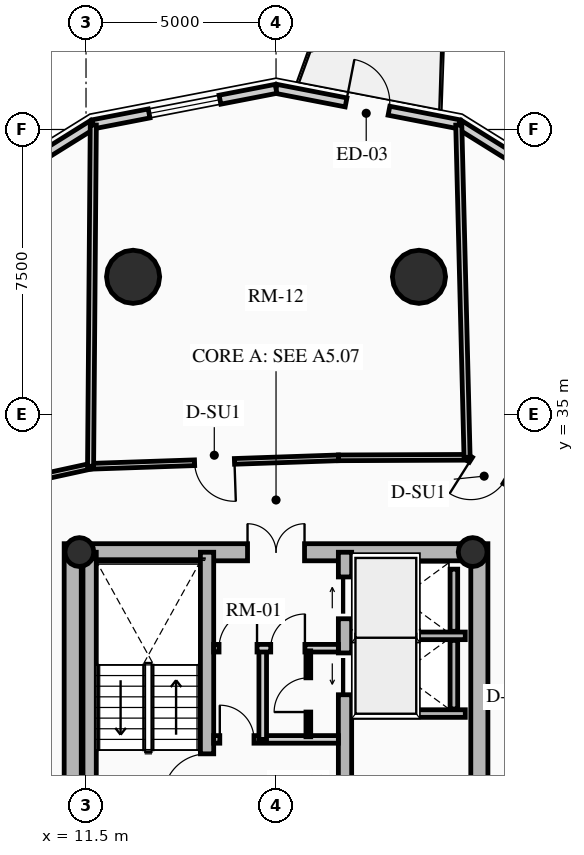
"""IFC4 building model, lengths in metres.
Left out: names, types, materials, properties, quantities, classifications, styles, units other than length and angle.
Written with IfcOpenShell. Run it as: python <this file> out.ifc"""

import sys

from ifc_helpers import new_model, si_unit, direction, frame, frame_2d, origin, origin_2d, place, context, subcontext, project, spatial, rectangle, circle, hollow_circle, extrude, source, transform, mapped, element, fill, save


model = new_model("IFC4")
c1 = context("Model", 3, precision=1e-05, world=origin(), true_north=direction((0.0, 1.0)))
c2 = subcontext(c1, "Body", "Model", "MODEL_VIEW")
j1 = project(units=[si_unit("LENGTHUNIT", "METRE"), si_unit("PLANEANGLEUNIT", "RADIAN")], contexts=[c1])
p1 = place(None, origin())
s1 = spatial("IfcSite", under=j1, at=p1, CompositionType="ELEMENT")
p2 = place(p1, origin())
s2 = spatial("IfcBuilding", under=s1, at=p2, CompositionType="ELEMENT")
p3 = place(p2, frame((0.0, 0.0, 84.7)))
s3 = spatial("IfcBuildingStorey", under=s2, at=p3, CompositionType="ELEMENT", Elevation=84.7)
for number, where, z_axis, x_axis in (
    (1, (11.15, 17.4, 0.0), (0.0, 0.0, 1.0), (0.0, 1.0, 0.0)),
    (2, (21.85, 17.4, 0.0), (0.0, 0.0, 1.0), (0.0, 1.0, 0.0)),
):
    element("IfcWall", number, at=place(p3, frame(where, z_axis=z_axis, x_axis=x_axis)), inside=s3, PredefinedType="SHEAR", context=c2, shape_type="SweptSolid", body=[
        extrude(rectangle(XDim=14.2, YDim=0.45, at=frame_2d((7.1, 0.0))), origin(), (0.0, 0.0, 1.0), 2.91),
    ])
p4 = place(p3, frame((11.15, 31.375, 0.0), z_axis=(0.0, 0.0, 1.0), x_axis=(1.0, 0.0, 0.0)))
e3 = element("IfcWall", 3, at=p4, inside=s3, PredefinedType="SHEAR", context=c2, shape_type="SweptSolid", body=[
    extrude(rectangle(XDim=10.7, YDim=0.45, at=frame_2d((5.35, 0.0))), origin(), (0.0, 0.0, 1.0), 2.91),
])
m1 = source(origin(), c2, "Body", "SweptSolid", [
    extrude(rectangle(XDim=1.5, YDim=2.02, at=frame_2d((0.75, 1.01))), frame((0.0, 0.235, 0.0), z_axis=(0.0, -1.0, 0.0), x_axis=(1.0, 0.0, 0.0)), (0.0, 0.0, 1.0), 0.47),
])
p5 = place(p4, frame((4.6, 0.0, 0.0)))
e4 = element("IfcOpeningElement", 4, at=p5, cuts=e3, PredefinedType="OPENING", context=c2, shape_type="MappedRepresentation", body=[
    mapped(m1, transform((0.0, 0.0, 0.0), x_axis=(1.0, 0.0, 0.0), y_axis=(0.0, 1.0, 0.0), z_axis=(0.0, 0.0, 1.0), scale=1.0)),
])
p6 = place(p3, frame((14.685, 17.625, 0.0), z_axis=(0.0, 0.0, 1.0), x_axis=(0.0, 1.0, 0.0)))
e5 = element("IfcWall", 5, at=p6, inside=s3, PredefinedType="SHEAR", context=c2, shape_type="SweptSolid", body=[
    extrude(rectangle(XDim=13.75, YDim=0.35, at=frame_2d((6.875, 0.0))), origin(), (0.0, 0.0, 1.0), 2.91),
])
m2 = source(origin(), c2, "Body", "SweptSolid", [
    extrude(rectangle(XDim=1.1, YDim=2.015, at=frame_2d((0.55, 1.007))), frame((0.0, 0.185, 0.0), z_axis=(0.0, -1.0, 0.0), x_axis=(1.0, 0.0, 0.0)), (0.0, 0.0, 1.0), 0.37),
])
p7 = place(p6, frame((4.875, 0.0, 0.0)))
e6 = element("IfcOpeningElement", 6, at=p7, cuts=e5, PredefinedType="OPENING", context=c2, shape_type="MappedRepresentation", body=[
    mapped(m2, transform((0.0, 0.0, 0.0), x_axis=(1.0, 0.0, 0.0), y_axis=(0.0, 1.0, 0.0), z_axis=(0.0, 0.0, 1.0), scale=1.0)),
])
m3 = source(origin(), c2, "Body", "SweptSolid", [
    extrude(rectangle(XDim=1.15, YDim=2.02, at=frame_2d((0.575, 1.01))), frame((0.0, 0.185, 0.0), z_axis=(0.0, -1.0, 0.0), x_axis=(1.0, 0.0, 0.0)), (0.0, 0.0, 1.0), 0.37),
])
p8 = place(p6, frame((7.295, 0.0, 0.0)))
e7 = element("IfcOpeningElement", 7, at=p8, cuts=e5, PredefinedType="OPENING", context=c2, shape_type="MappedRepresentation", body=[
    mapped(m3, transform((0.0, 0.0, 0.0), x_axis=(1.0, 0.0, 0.0), y_axis=(0.0, 1.0, 0.0), z_axis=(0.0, 0.0, 1.0), scale=1.0)),
])
p9 = place(p3, frame((18.315, 17.625, 0.0), z_axis=(0.0, 0.0, 1.0), x_axis=(0.0, 1.0, 0.0)))
e8 = element("IfcWall", 8, at=p9, inside=s3, PredefinedType="SHEAR", context=c2, shape_type="SweptSolid", body=[
    extrude(rectangle(XDim=13.75, YDim=0.35, at=frame_2d((6.875, 0.0))), origin(), (0.0, 0.0, 1.0), 2.91),
])
p10 = place(p9, frame((10.0, 0.0, 0.0)))
e9 = element("IfcOpeningElement", 9, at=p10, cuts=e8, PredefinedType="OPENING", context=c2, shape_type="MappedRepresentation", body=[
    mapped(m2, transform((0.0, 0.0, 0.0), x_axis=(1.0, 0.0, 0.0), y_axis=(0.0, 1.0, 0.0), z_axis=(0.0, 0.0, 1.0), scale=1.0)),
])
p11 = place(p9, frame((12.0, 0.0, 0.0)))
e10 = element("IfcOpeningElement", 10, at=p11, cuts=e8, PredefinedType="OPENING", context=c2, shape_type="MappedRepresentation", body=[
    mapped(m2, transform((0.0, 0.0, 0.0), x_axis=(1.0, 0.0, 0.0), y_axis=(0.0, 1.0, 0.0), z_axis=(0.0, 0.0, 1.0), scale=1.0)),
])
p12 = place(p9, frame((5.305, 0.0, 0.0)))
e11 = element("IfcOpeningElement", 11, at=p12, cuts=e8, PredefinedType="OPENING", context=c2, shape_type="MappedRepresentation", body=[
    mapped(m3, transform((0.0, 0.0, 0.0), x_axis=(1.0, 0.0, 0.0), y_axis=(0.0, 1.0, 0.0), z_axis=(0.0, 0.0, 1.0), scale=1.0)),
])
p13 = place(p3, frame((11.595, 24.655, 0.0), z_axis=(0.0, 0.0, 1.0), x_axis=(0.0, 1.0, 0.0)))
e12 = element("IfcWall", 12, at=p13, inside=s3, PredefinedType="SHEAR", context=c2, shape_type="SweptSolid", body=[
    extrude(rectangle(XDim=6.72, YDim=0.35, at=frame_2d((3.36, 0.0))), origin(), (0.0, 0.0, 1.0), 2.91),
])
for number, where, z_axis, x_axis in (
    (13, (11.325, 31.38, 0.0), (0.0, 0.0, 1.0), (1.0, 0.0, 0.0)),
    (14, (21.675, 31.38, 0.0), (0.0, 0.0, 1.0), (1.0, 0.0, 0.0)),
):
    element("IfcColumn", number, at=place(p3, frame(where, z_axis=z_axis, x_axis=x_axis)), inside=s3, PredefinedType="COLUMN", context=c2, shape_type="SweptSolid", body=[
        extrude(hollow_circle(Radius=0.38, WallThickness=0.032, at=origin_2d()), origin(), (0.0, 0.0, 1.0), 2.91),
    ])
for number, where, z_axis, x_axis in (
    (15, (20.261, 38.623, 0.0), (0.0, 0.0, 1.0), (1.0, 0.0, 0.0)),
    (16, (12.739, 38.623, 0.0), (0.0, 0.0, 1.0), (1.0, 0.0, 0.0)),
):
    element("IfcColumn", number, at=place(p3, frame(where, z_axis=z_axis, x_axis=x_axis)), inside=s3, PredefinedType="USERDEFINED", context=c2, shape_type="SweptSolid", body=[
        extrude(circle(Radius=0.7, at=origin_2d()), origin(), (0.0, 0.0, 1.0), 2.91),
    ])
p14 = place(p3, frame((21.315, 42.637, 0.0), z_axis=(0.0, 0.0, 1.0), x_axis=(0.848520380187, -0.529162701263, 0.0)))
e17 = element("IfcWall", 17, at=p14, inside=s3, PredefinedType="SOLIDWALL", context=c2, shape_type="SweptSolid", body=[
    extrude(rectangle(XDim=5.119, YDim=0.24, at=frame_2d((2.56, 0.0))), origin(), (0.0, 0.0, 1.0), 2.179),
])
p15 = place(p3, frame((16.5, 43.57, 0.0), z_axis=(0.0, 0.0, 1.0), x_axis=(0.981723785992, -0.190311344954, 0.0)))
e18 = element("IfcWall", 18, at=p15, inside=s3, PredefinedType="SOLIDWALL", context=c2, shape_type="SweptSolid", body=[
    extrude(rectangle(XDim=4.904, YDim=0.24, at=frame_2d((2.452, 0.0))), origin(), (0.0, 0.0, 1.0), 2.179),
])
m4 = source(origin(), c2, "Body", "SweptSolid", [
    extrude(rectangle(XDim=1.15, YDim=2.005, at=frame_2d((0.575, 1.002))), frame((0.0, 0.13, 0.0), z_axis=(0.0, -1.0, 0.0), x_axis=(1.0, 0.0, 0.0)), (0.0, 0.0, 1.0), 0.26),
])
p16 = place(p15, frame((1.877, 0.0, 0.0)))
e19 = element("IfcOpeningElement", 19, at=p16, cuts=e18, PredefinedType="OPENING", context=c2, shape_type="MappedRepresentation", body=[
    mapped(m4, transform((0.0, 0.0, 0.0), x_axis=(1.0, 0.0, 0.0), y_axis=(0.0, 1.0, 0.0), z_axis=(0.0, 0.0, 1.0), scale=1.0)),
])
p17 = place(p3, frame((11.685, 42.637, 0.0), z_axis=(0.0, 0.0, 1.0), x_axis=(0.981723785992, 0.190311344954, 0.0)))
e20 = element("IfcWall", 20, at=p17, inside=s3, PredefinedType="SOLIDWALL", context=c2, shape_type="SweptSolid", body=[
    extrude(rectangle(XDim=4.904, YDim=0.24, at=frame_2d((2.452, 0.0))), origin(), (0.0, 0.0, 1.0), 2.179),
])
m5 = source(origin(), c2, "Body", "SweptSolid", [
    extrude(rectangle(XDim=1.9, YDim=1.35, at=frame_2d((0.95, 0.675))), frame((0.0, 0.13, 0.0), z_axis=(0.0, -1.0, 0.0), x_axis=(1.0, 0.0, 0.0)), (0.0, 0.0, 1.0), 0.26),
])
p18 = place(p17, frame((1.502, 0.0, 0.65)))
e21 = element("IfcOpeningElement", 21, at=p18, cuts=e20, PredefinedType="OPENING", context=c2, shape_type="MappedRepresentation", body=[
    mapped(m5, transform((0.0, 0.0, 0.0), x_axis=(1.0, 0.0, 0.0), y_axis=(0.0, 1.0, 0.0), z_axis=(0.0, 0.0, 1.0), scale=1.0)),
])
p19 = place(p3, frame((7.342, 39.928, 0.0), z_axis=(0.0, 0.0, 1.0), x_axis=(0.848520380187, 0.529162701263, 0.0)))
e22 = element("IfcWall", 22, at=p19, inside=s3, PredefinedType="SOLIDWALL", context=c2, shape_type="SweptSolid", body=[
    extrude(rectangle(XDim=5.119, YDim=0.24, at=frame_2d((2.56, 0.0))), origin(), (0.0, 0.0, 1.0), 2.179),
])
for number, where, z_axis, x_axis in (
    (23, (18.51, 27.13, 0.0), (0.0, 0.0, 1.0), (1.0, 0.0, 0.0)),
    (24, (18.51, 29.175, 0.0), (0.0, 0.0, 1.0), (1.0, 0.0, 0.0)),
):
    element("IfcWall", number, at=place(p3, frame(where, z_axis=z_axis, x_axis=x_axis)), inside=s3, PredefinedType="SHEAR", context=c2, shape_type="SweptSolid", body=[
        extrude(rectangle(XDim=2.97, YDim=0.2, at=frame_2d((1.485, 0.0))), origin(), (0.0, 0.0, 1.0), 2.91),
    ])
p20 = place(p3, frame((21.18, 27.25, 0.0), z_axis=(0.0, 0.0, 1.0), x_axis=(0.0, 1.0, 0.0)))
e25 = element("IfcWall", 25, at=p20, inside=s3, PredefinedType="SHEAR", context=c2, shape_type="SweptSolid", body=[
    extrude(rectangle(XDim=1.805, YDim=0.2, at=frame_2d((0.902, 0.0))), origin(), (0.0, 0.0, 1.0), 2.91),
])
p21 = place(p3, frame((21.18, 29.295, 0.0), z_axis=(0.0, 0.0, 1.0), x_axis=(0.0, 1.0, 0.0)))
e26 = element("IfcWall", 26, at=p21, inside=s3, PredefinedType="SHEAR", context=c2, shape_type="SweptSolid", body=[
    extrude(rectangle(XDim=1.635, YDim=0.2, at=frame_2d((0.817, 0.0))), origin(), (0.0, 0.0, 1.0), 2.91),
])
p22 = place(p3, frame((14.86, 26.45, 0.0), z_axis=(0.0, 0.0, 1.0), x_axis=(1.0, 0.0, 0.0)))
e27 = element("IfcWall", 27, at=p22, inside=s3, PredefinedType="PARTITIONING", context=c2, shape_type="SweptSolid", body=[
    extrude(rectangle(XDim=3.28, YDim=0.2, at=frame_2d((1.64, 0.0))), origin(), (0.0, 0.0, 1.0), 2.655),
])
m6 = source(origin(), c2, "Body", "SweptSolid", [
    extrude(rectangle(XDim=0.9, YDim=2.005, at=frame_2d((0.45, 1.002))), frame((0.0, 0.11, 0.0), z_axis=(0.0, -1.0, 0.0), x_axis=(1.0, 0.0, 0.0)), (0.0, 0.0, 1.0), 0.22),
])
p23 = place(p22, frame((0.16, 0.0, 0.0)))
e28 = element("IfcOpeningElement", 28, at=p23, cuts=e27, PredefinedType="OPENING", context=c2, shape_type="MappedRepresentation", body=[
    mapped(m6, transform((0.0, 0.0, 0.0), x_axis=(1.0, 0.0, 0.0), y_axis=(0.0, 1.0, 0.0), z_axis=(0.0, 0.0, 1.0), scale=1.0)),
])
p24 = place(p3, frame((16.15, 26.45, 0.0), z_axis=(0.0, 0.0, 1.0), x_axis=(0.0, 1.0, 0.0)))
e29 = element("IfcWall", 29, at=p24, inside=s3, PredefinedType="PARTITIONING", context=c2, shape_type="SweptSolid", body=[
    extrude(rectangle(XDim=2.4, YDim=0.2, at=frame_2d((1.2, 0.0))), origin(), (0.0, 0.0, 1.0), 2.655),
])
p25 = place(p3, frame((14.86, 28.85, 0.0), z_axis=(0.0, 0.0, 1.0), x_axis=(1.0, 0.0, 0.0)))
e30 = element("IfcWall", 30, at=p25, inside=s3, PredefinedType="PARTITIONING", context=c2, shape_type="SweptSolid", body=[
    extrude(rectangle(XDim=3.28, YDim=0.2, at=frame_2d((1.64, 0.0))), origin(), (0.0, 0.0, 1.0), 2.655),
])
m7 = source(origin(), c2, "Body", "SweptSolid", [
    extrude(rectangle(XDim=1.0, YDim=2.015, at=frame_2d((0.5, 1.007))), frame((0.0, 0.11, 0.0), z_axis=(0.0, -1.0, 0.0), x_axis=(1.0, 0.0, 0.0)), (0.0, 0.0, 1.0), 0.22),
])
p26 = place(p25, frame((0.14, 0.0, 0.0)))
e31 = element("IfcOpeningElement", 31, at=p26, cuts=e30, PredefinedType="OPENING", context=c2, shape_type="MappedRepresentation", body=[
    mapped(m7, transform((0.0, 0.0, 0.0), x_axis=(1.0, 0.0, 0.0), y_axis=(0.0, 1.0, 0.0), z_axis=(0.0, 0.0, 1.0), scale=1.0)),
])
p27 = place(p25, frame((1.5, 0.0, 0.0)))
e32 = element("IfcOpeningElement", 32, at=p27, cuts=e30, PredefinedType="OPENING", context=c2, shape_type="MappedRepresentation", body=[
    mapped(m6, transform((0.0, 0.0, 0.0), x_axis=(1.0, 0.0, 0.0), y_axis=(0.0, 1.0, 0.0), z_axis=(0.0, 0.0, 1.0), scale=1.0)),
])
p28 = place(p3, frame((17.35, 26.52, 0.0), z_axis=(0.0, 0.0, 1.0), x_axis=(0.0, 1.0, 0.0)))
e33 = element("IfcWall", 33, at=p28, inside=s3, PredefinedType="PARTITIONING", context=c2, shape_type="SweptSolid", body=[
    extrude(rectangle(XDim=2.26, YDim=0.125, at=frame_2d((1.13, 0.0))), origin(), (0.0, 0.0, 1.0), 2.655),
])
m8 = source(origin(), c2, "Body", "SweptSolid", [
    extrude(rectangle(XDim=0.9, YDim=2.005, at=frame_2d((0.45, 1.002))), frame((0.0, 0.073, 0.0), z_axis=(0.0, -1.0, 0.0), x_axis=(1.0, 0.0, 0.0)), (0.0, 0.0, 1.0), 0.145),
])
p29 = place(p28, frame((0.65, 0.0, 0.0)))
e34 = element("IfcOpeningElement", 34, at=p29, cuts=e33, PredefinedType="OPENING", context=c2, shape_type="MappedRepresentation", body=[
    mapped(m8, transform((0.0, 0.0, 0.0), x_axis=(1.0, 0.0, 0.0), y_axis=(0.0, 1.0, 0.0), z_axis=(0.0, 0.0, 1.0), scale=1.0)),
])
p30 = place(p3, frame((22.877, 33.022, 0.0), z_axis=(0.0, 0.0, 1.0), x_axis=(-0.845895608855, 0.533348496689, 0.0)))
e35 = element("IfcWall", 35, at=p30, inside=s3, PredefinedType="PARTITIONING", context=c2, shape_type="SweptSolid", body=[
    extrude(rectangle(XDim=1.597, YDim=0.15, at=frame_2d((0.798, 0.0))), origin(), (0.0, 0.0, 1.0), 2.225),
])
m9 = source(origin(), c2, "Body", "SweptSolid", [
    extrude(rectangle(XDim=1.05, YDim=2.015, at=frame_2d((0.525, 1.007))), frame((0.0, 0.085, 0.0), z_axis=(0.0, -1.0, 0.0), x_axis=(1.0, 0.0, 0.0)), (0.0, 0.0, 1.0), 0.17),
])
p31 = place(p30, frame((0.427, 0.0, 0.0)))
e36 = element("IfcOpeningElement", 36, at=p31, cuts=e35, PredefinedType="OPENING", context=c2, shape_type="MappedRepresentation", body=[
    mapped(m9, transform((0.0, 0.0, 0.0), x_axis=(1.0, 0.0, 0.0), y_axis=(0.0, 1.0, 0.0), z_axis=(0.0, 0.0, 1.0), scale=1.0)),
])
p32 = place(p3, frame((21.527, 33.873, 0.0), z_axis=(0.0, 0.0, 1.0), x_axis=(-0.999991838845, -0.004040079574, 0.0)))
e37 = element("IfcWall", 37, at=p32, inside=s3, PredefinedType="PARTITIONING", context=c2, shape_type="SweptSolid", body=[
    extrude(rectangle(XDim=3.384, YDim=0.15, at=frame_2d((1.692, 0.0))), origin(), (0.0, 0.0, 1.0), 2.225),
])
p33 = place(p3, frame((18.143, 33.86, 0.0), z_axis=(0.0, 0.0, 1.0), x_axis=(-0.999419208319, -0.034077060363, 0.0)))
e38 = element("IfcWall", 38, at=p33, inside=s3, PredefinedType="PARTITIONING", context=c2, shape_type="SweptSolid", body=[
    extrude(rectangle(XDim=6.527, YDim=0.15, at=frame_2d((3.263, 0.0))), origin(), (0.0, 0.0, 1.0), 2.225),
])
p34 = place(p33, frame((2.738, 0.0, 0.0)))
e39 = element("IfcOpeningElement", 39, at=p34, cuts=e38, PredefinedType="OPENING", context=c2, shape_type="MappedRepresentation", body=[
    mapped(m9, transform((0.0, 0.0, 0.0), x_axis=(1.0, 0.0, 0.0), y_axis=(0.0, 1.0, 0.0), z_axis=(0.0, 0.0, 1.0), scale=1.0)),
])
p35 = place(p3, frame((11.62, 33.637, 0.0), z_axis=(0.0, 0.0, 1.0), x_axis=(-0.97702579435, -0.213121085711, 0.0)))
e40 = element("IfcWall", 40, at=p35, inside=s3, PredefinedType="PARTITIONING", context=c2, shape_type="SweptSolid", body=[
    extrude(rectangle(XDim=1.935, YDim=0.15, at=frame_2d((0.967, 0.0))), origin(), (0.0, 0.0, 1.0), 2.225),
])
p36 = place(p3, frame((21.527, 33.873, 0.0), z_axis=(0.0, 0.0, 1.0), x_axis=(-0.024952442794, 0.999688639327, 0.0)))
e41 = element("IfcWall", 41, at=p36, inside=s3, PredefinedType="PARTITIONING", context=c2, shape_type="SweptSolid", body=[
    extrude(rectangle(XDim=8.747, YDim=0.16, at=frame_2d((4.374, 0.0))), origin(), (0.0, 0.0, 1.0), 2.179),
])
p37 = place(p3, frame((11.62, 33.637, 0.0), z_axis=(0.0, 0.0, 1.0), x_axis=(0.007965167065, 0.999968277554, 0.0)))
e42 = element("IfcWall", 42, at=p37, inside=s3, PredefinedType="PARTITIONING", context=c2, shape_type="SweptSolid", body=[
    extrude(rectangle(XDim=8.981, YDim=0.16, at=frame_2d((4.49, 0.0))), origin(), (0.0, 0.0, 1.0), 2.179),
])
m10 = source(origin(), c2, "Body", "SweptSolid", [
    extrude(rectangle(XDim=1.15, YDim=2.005, at=frame_2d((0.575, 1.002))), frame((0.0, 0.025, 0.0), z_axis=(0.0, -1.0, 0.0), x_axis=(1.0, 0.0, 0.0)), (0.0, 0.0, 1.0), 0.05),
])
p38 = place(p16, origin())
e43 = element("IfcDoor", 43, at=p38, inside=s3, OperationType="SINGLE_SWING_LEFT", PredefinedType="DOOR", context=c2, shape_type="MappedRepresentation", body=[
    mapped(m10, transform((0.0, 0.0, 0.0), x_axis=(1.0, 0.0, 0.0), y_axis=(0.0, 1.0, 0.0), z_axis=(0.0, 0.0, 1.0), scale=1.0)),
])
fill(e19, e43)
m11 = source(origin(), c2, "Body", "SweptSolid", [
    extrude(rectangle(XDim=1.9, YDim=1.35, at=frame_2d((0.95, 0.675))), frame((0.0, 0.03, 0.0), z_axis=(0.0, -1.0, 0.0), x_axis=(1.0, 0.0, 0.0)), (0.0, 0.0, 1.0), 0.06),
])
p39 = place(p18, origin())
e44 = element("IfcWindow", 44, at=p39, inside=s3, PartitioningType="DOUBLE_PANEL_VERTICAL", PredefinedType="WINDOW", context=c2, shape_type="MappedRepresentation", body=[
    mapped(m11, transform((0.0, 0.0, 0.0), x_axis=(1.0, 0.0, 0.0), y_axis=(0.0, 1.0, 0.0), z_axis=(0.0, 0.0, 1.0), scale=1.0)),
])
fill(e21, e44)
m12 = source(origin(), c2, "Body", "SweptSolid", [
    extrude(rectangle(XDim=1.1, YDim=2.015, at=frame_2d((0.55, 1.007))), frame((0.0, 0.025, 0.0), z_axis=(0.0, -1.0, 0.0), x_axis=(1.0, 0.0, 0.0)), (0.0, 0.0, 1.0), 0.05),
])
p40 = place(p10, origin())
e45 = element("IfcDoor", 45, at=p40, inside=s3, OperationType="SLIDING_TO_LEFT", PredefinedType="DOOR", context=c2, shape_type="MappedRepresentation", body=[
    mapped(m12, transform((0.0, 0.0, 0.0), x_axis=(1.0, 0.0, 0.0), y_axis=(0.0, 1.0, 0.0), z_axis=(0.0, 0.0, 1.0), scale=1.0)),
])
fill(e9, e45)
p41 = place(p11, origin())
e46 = element("IfcDoor", 46, at=p41, inside=s3, OperationType="SLIDING_TO_RIGHT", PredefinedType="DOOR", context=c2, shape_type="MappedRepresentation", body=[
    mapped(m12, transform((0.0, 0.0, 0.0), x_axis=(1.0, 0.0, 0.0), y_axis=(0.0, 1.0, 0.0), z_axis=(0.0, 0.0, 1.0), scale=1.0)),
])
fill(e10, e46)
m13 = source(origin(), c2, "Body", "SweptSolid", [
    extrude(rectangle(XDim=1.15, YDim=2.02, at=frame_2d((0.575, 1.01))), frame((0.0, 0.025, 0.0), z_axis=(0.0, -1.0, 0.0), x_axis=(1.0, 0.0, 0.0)), (0.0, 0.0, 1.0), 0.05),
])
p42 = place(p8, origin())
e47 = element("IfcDoor", 47, at=p42, inside=s3, OperationType="SINGLE_SWING_LEFT", PredefinedType="DOOR", context=c2, shape_type="MappedRepresentation", body=[
    mapped(m13, transform((0.0, 0.0, 0.0), x_axis=(1.0, 0.0, 0.0), y_axis=(0.0, 1.0, 0.0), z_axis=(0.0, 0.0, 1.0), scale=1.0)),
])
fill(e7, e47)
m14 = source(origin(), c2, "Body", "SweptSolid", [
    extrude(rectangle(XDim=1.5, YDim=2.02, at=frame_2d((0.75, 1.01))), frame((0.0, 0.025, 0.0), z_axis=(0.0, -1.0, 0.0), x_axis=(1.0, 0.0, 0.0)), (0.0, 0.0, 1.0), 0.05),
])
p43 = place(p5, origin())
e48 = element("IfcDoor", 48, at=p43, inside=s3, OperationType="DOUBLE_DOOR_SINGLE_SWING", PredefinedType="DOOR", context=c2, shape_type="MappedRepresentation", body=[
    mapped(m14, transform((0.0, 0.0, 0.0), x_axis=(1.0, 0.0, 0.0), y_axis=(0.0, 1.0, 0.0), z_axis=(0.0, 0.0, 1.0), scale=1.0)),
])
fill(e4, e48)
m15 = source(origin(), c2, "Body", "SweptSolid", [
    extrude(rectangle(XDim=0.9, YDim=2.005, at=frame_2d((0.45, 1.002))), frame((0.0, 0.025, 0.0), z_axis=(0.0, -1.0, 0.0), x_axis=(1.0, 0.0, 0.0)), (0.0, 0.0, 1.0), 0.05),
])
p44 = place(p23, origin())
e49 = element("IfcDoor", 49, at=p44, inside=s3, OperationType="SINGLE_SWING_LEFT", PredefinedType="DOOR", context=c2, shape_type="MappedRepresentation", body=[
    mapped(m15, transform((0.0, 0.0, 0.0), x_axis=(1.0, 0.0, 0.0), y_axis=(0.0, 1.0, 0.0), z_axis=(0.0, 0.0, 1.0), scale=1.0)),
])
fill(e28, e49)
m16 = source(origin(), c2, "Body", "SweptSolid", [
    extrude(rectangle(XDim=1.0, YDim=2.015, at=frame_2d((0.5, 1.007))), frame((0.0, 0.025, 0.0), z_axis=(0.0, -1.0, 0.0), x_axis=(1.0, 0.0, 0.0)), (0.0, 0.0, 1.0), 0.05),
])
p45 = place(p26, origin())
e50 = element("IfcDoor", 50, at=p45, inside=s3, OperationType="SINGLE_SWING_RIGHT", PredefinedType="DOOR", context=c2, shape_type="MappedRepresentation", body=[
    mapped(m16, transform((0.0, 0.0, 0.0), x_axis=(1.0, 0.0, 0.0), y_axis=(0.0, 1.0, 0.0), z_axis=(0.0, 0.0, 1.0), scale=1.0)),
])
fill(e31, e50)
p46 = place(p27, origin())
e51 = element("IfcDoor", 51, at=p46, inside=s3, OperationType="SINGLE_SWING_RIGHT", PredefinedType="DOOR", context=c2, shape_type="MappedRepresentation", body=[
    mapped(m15, transform((0.0, 0.0, 0.0), x_axis=(1.0, 0.0, 0.0), y_axis=(0.0, 1.0, 0.0), z_axis=(0.0, 0.0, 1.0), scale=1.0)),
])
fill(e32, e51)
p47 = place(p29, origin())
e52 = element("IfcDoor", 52, at=p47, inside=s3, OperationType="SINGLE_SWING_LEFT", PredefinedType="DOOR", context=c2, shape_type="MappedRepresentation", body=[
    mapped(m15, transform((0.0, 0.0, 0.0), x_axis=(1.0, 0.0, 0.0), y_axis=(0.0, 1.0, 0.0), z_axis=(0.0, 0.0, 1.0), scale=1.0)),
])
fill(e34, e52)
m17 = source(origin(), c2, "Body", "SweptSolid", [
    extrude(rectangle(XDim=1.05, YDim=2.015, at=frame_2d((0.525, 1.007))), frame((0.0, 0.025, 0.0), z_axis=(0.0, -1.0, 0.0), x_axis=(1.0, 0.0, 0.0)), (0.0, 0.0, 1.0), 0.05),
])
p48 = place(p31, origin())
e53 = element("IfcDoor", 53, at=p48, inside=s3, OperationType="SINGLE_SWING_RIGHT", PredefinedType="DOOR", context=c2, shape_type="MappedRepresentation", body=[
    mapped(m17, transform((0.0, 0.0, 0.0), x_axis=(1.0, 0.0, 0.0), y_axis=(0.0, 1.0, 0.0), z_axis=(0.0, 0.0, 1.0), scale=1.0)),
])
fill(e36, e53)
p49 = place(p34, origin())
e54 = element("IfcDoor", 54, at=p49, inside=s3, OperationType="SINGLE_SWING_LEFT", PredefinedType="DOOR", context=c2, shape_type="MappedRepresentation", body=[
    mapped(m17, transform((0.0, 0.0, 0.0), x_axis=(1.0, 0.0, 0.0), y_axis=(0.0, 1.0, 0.0), z_axis=(0.0, 0.0, 1.0), scale=1.0)),
])
fill(e39, e54)
save(model, sys.argv[1])
